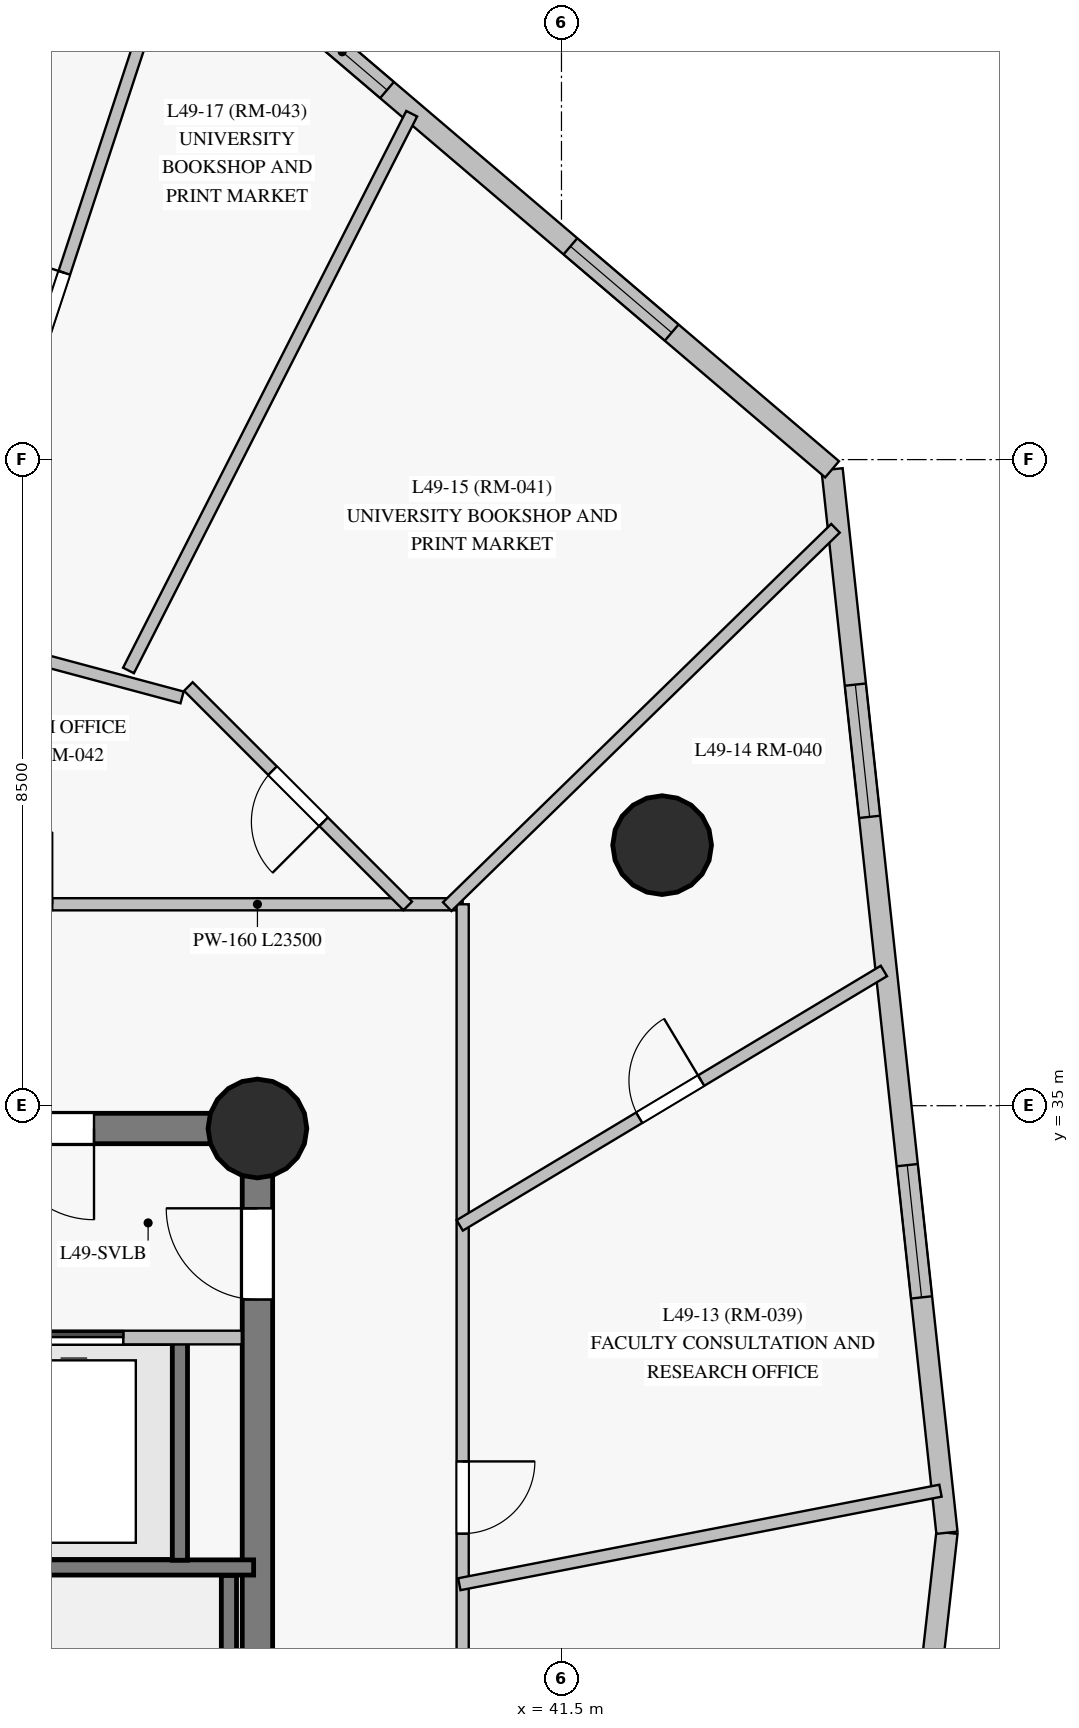
"""IFC4 building model, lengths in metres.
Left out: names, types, materials, properties, quantities, classifications, styles, units other than length and angle.
Written with IfcOpenShell. Run it as: python <this file> out.ifc"""

import sys

from ifc_helpers import new_model, si_unit, direction, frame, frame_2d, origin, origin_with_axes, origin_2d, place, context, subcontext, project, spatial, rectangle, circle, extrude, source, transform, mapped, element, fill, save


model = new_model("IFC4")
c1 = context("Model", 3, precision=1e-05, world=origin(), true_north=direction((0.0, 1.0)))
c2 = subcontext(c1, "Body", "Model", "MODEL_VIEW")
j1 = project(units=[si_unit("LENGTHUNIT", "METRE"), si_unit("PLANEANGLEUNIT", "RADIAN")], contexts=[c1])
p1 = place(None, origin())
s1 = spatial("IfcSite", under=j1, at=p1, CompositionType="ELEMENT")
p2 = place(p1, origin())
s2 = spatial("IfcBuilding", under=s1, at=p2, CompositionType="ELEMENT")
p3 = place(p2, frame((0.0, 0.0, 171.8)))
s3 = spatial("IfcBuildingStorey", under=s2, at=p3, CompositionType="ELEMENT", Elevation=171.8)
p4 = place(p3, frame((37.5, 18.3, 0.0), z_axis=(0.0, 0.0, 1.0), x_axis=(0.0, 1.0, 0.0)))
e1 = element("IfcWall", 1, at=p4, inside=s3, PredefinedType="SHEAR", context=c2, shape_type="SweptSolid", body=[
    extrude(rectangle(XDim=16.4, YDim=0.4, at=frame_2d((8.2, 0.0))), origin(), (0.0, 0.0, 1.0), 2.825),
])
p5 = place(p4, frame((14.15, 0.0, 0.0)))
e2 = element("IfcOpeningElement", 2, at=p5, cuts=e1, PredefinedType="OPENING", context=c2, shape_type="SweptSolid", body=[
    extrude(rectangle(XDim=1.2, YDim=2.15, at=frame_2d((0.6, 1.075))), frame((0.0, 0.21, 0.0), z_axis=(0.0, -1.0, 0.0), x_axis=(1.0, 0.0, 0.0)), (0.0, 0.0, 1.0), 0.42),
])
p6 = place(p3, frame((37.5, 34.7, 0.0), z_axis=(0.0, 0.0, 1.0), x_axis=(-1.0, 0.0, 0.0)))
e3 = element("IfcWall", 3, at=p6, inside=s3, PredefinedType="SHEAR", context=c2, shape_type="SweptSolid", body=[
    extrude(rectangle(XDim=10.95, YDim=0.4, at=frame_2d((5.475, 0.0))), origin(), (0.0, 0.0, 1.0), 2.825),
])
p7 = place(p6, frame((2.15, 0.0, 0.0)))
e4 = element("IfcOpeningElement", 4, at=p7, cuts=e3, PredefinedType="OPENING", context=c2, shape_type="SweptSolid", body=[
    extrude(rectangle(XDim=1.2, YDim=2.15, at=frame_2d((0.6, 1.075))), frame((0.0, 0.21, 0.0), z_axis=(0.0, -1.0, 0.0), x_axis=(1.0, 0.0, 0.0)), (0.0, 0.0, 1.0), 0.42),
])
p8 = place(p6, frame((6.35, 0.0, 0.0)))
e5 = element("IfcOpeningElement", 5, at=p8, cuts=e3, PredefinedType="OPENING", context=c2, shape_type="SweptSolid", body=[
    extrude(rectangle(XDim=1.1, YDim=2.15, at=frame_2d((0.55, 1.075))), frame((0.0, 0.21, 0.0), z_axis=(0.0, -1.0, 0.0), x_axis=(1.0, 0.0, 0.0)), (0.0, 0.0, 1.0), 0.42),
])
m1 = source(origin_with_axes(), c2, "Body", "SweptSolid", [
    extrude(circle(Radius=0.65, at=origin_2d()), origin(), (0.0, 0.0, 1.0), 3.05),
])
for number, where, z_axis, x_axis in (
    (6, (37.5, 34.7, 0.0), (0.0, 0.0, 1.0), (1.0, 0.0, 0.0)),
    (7, (42.824, 38.428, 0.0), (0.0, 0.0, 1.0), (1.0, 0.0, 0.0)),
):
    element("IfcColumn", number, at=place(p3, frame(where, z_axis=z_axis, x_axis=x_axis)), inside=s3, PredefinedType="COLUMN", context=c2, shape_type="MappedRepresentation", body=[
        mapped(m1, transform((0.0, 0.0, 0.0), scale=1.0)),
    ])
p9 = place(p3, frame((45.484, 19.686, 0.0), z_axis=(0.0, 0.0, 1.0), x_axis=(0.111472313182, 0.993767539918, 0.0)))
e8 = element("IfcWall", 8, at=p9, inside=s3, PredefinedType="SOLIDWALL", context=c2, shape_type="SweptSolid", body=[
    extrude(rectangle(XDim=9.757, YDim=0.28, at=frame_2d((4.878, 0.0))), origin(), (0.0, 0.0, 1.0), 2.825),
])
p10 = place(p9, frame((1.069, 0.0, 0.85)))
e9 = element("IfcOpeningElement", 9, at=p10, cuts=e8, PredefinedType="OPENING", context=c2, shape_type="SweptSolid", body=[
    extrude(rectangle(XDim=1.75, YDim=1.65, at=frame_2d((0.875, 0.825))), frame((0.0, 0.15, 0.0), z_axis=(0.0, -1.0, 0.0), x_axis=(1.0, 0.0, 0.0)), (0.0, 0.0, 1.0), 0.3),
])
p11 = place(p9, frame((5.888, 0.0, 0.85)))
e10 = element("IfcOpeningElement", 10, at=p11, cuts=e8, PredefinedType="OPENING", context=c2, shape_type="SweptSolid", body=[
    extrude(rectangle(XDim=1.75, YDim=1.65, at=frame_2d((0.875, 0.825))), frame((0.0, 0.15, 0.0), z_axis=(0.0, -1.0, 0.0), x_axis=(1.0, 0.0, 0.0)), (0.0, 0.0, 1.0), 0.3),
])
p12 = place(p3, frame((46.571, 29.382, 0.0), z_axis=(0.0, 0.0, 1.0), x_axis=(-0.107380334405, 0.994218016223, 0.0)))
e11 = element("IfcWall", 11, at=p12, inside=s3, PredefinedType="SOLIDWALL", context=c2, shape_type="SweptSolid", body=[
    extrude(rectangle(XDim=14.071, YDim=0.28, at=frame_2d((7.036, 0.0))), origin(), (0.0, 0.0, 1.0), 2.825),
])
p13 = place(p12, frame((3.114, 0.0, 0.85)))
e12 = element("IfcOpeningElement", 12, at=p13, cuts=e11, PredefinedType="OPENING", context=c2, shape_type="SweptSolid", body=[
    extrude(rectangle(XDim=1.75, YDim=1.65, at=frame_2d((0.875, 0.825))), frame((0.0, 0.15, 0.0), z_axis=(0.0, -1.0, 0.0), x_axis=(1.0, 0.0, 0.0)), (0.0, 0.0, 1.0), 0.3),
])
p14 = place(p12, frame((9.473, 0.0, 0.85)))
e13 = element("IfcOpeningElement", 13, at=p14, cuts=e11, PredefinedType="OPENING", context=c2, shape_type="SweptSolid", body=[
    extrude(rectangle(XDim=1.75, YDim=1.65, at=frame_2d((0.875, 0.825))), frame((0.0, 0.15, 0.0), z_axis=(0.0, -1.0, 0.0), x_axis=(1.0, 0.0, 0.0)), (0.0, 0.0, 1.0), 0.3),
])
p15 = place(p3, frame((45.06, 43.372, 0.0), z_axis=(0.0, 0.0, 1.0), x_axis=(-0.761082698503, 0.64865485895, 0.0)))
e14 = element("IfcWall", 14, at=p15, inside=s3, PredefinedType="SOLIDWALL", context=c2, shape_type="SweptSolid", body=[
    extrude(rectangle(XDim=9.761, YDim=0.28, at=frame_2d((4.88, 0.0))), origin(), (0.0, 0.0, 1.0), 2.825),
])
p16 = place(p15, frame((2.773, 0.0, 0.85)))
e15 = element("IfcOpeningElement", 15, at=p16, cuts=e14, PredefinedType="OPENING", context=c2, shape_type="SweptSolid", body=[
    extrude(rectangle(XDim=1.75, YDim=1.65, at=frame_2d((0.875, 0.825))), frame((0.0, 0.15, 0.0), z_axis=(0.0, -1.0, 0.0), x_axis=(1.0, 0.0, 0.0)), (0.0, 0.0, 1.0), 0.3),
])
p17 = place(p15, frame((7.693, 0.0, 0.85)))
e16 = element("IfcOpeningElement", 16, at=p17, cuts=e14, PredefinedType="OPENING", context=c2, shape_type="SweptSolid", body=[
    extrude(rectangle(XDim=1.55, YDim=1.65, at=frame_2d((0.775, 0.825))), frame((0.0, 0.15, 0.0), z_axis=(0.0, -1.0, 0.0), x_axis=(1.0, 0.0, 0.0)), (0.0, 0.0, 1.0), 0.3),
])
p18 = place(p3, frame((37.125, 21.32, 0.0), z_axis=(0.0, 0.0, 1.0), x_axis=(0.0, 1.0, 0.0)))
e17 = element("IfcWall", 17, at=p18, inside=s3, PredefinedType="SHEAR", context=c2, shape_type="SweptSolid", body=[
    extrude(rectangle(XDim=7.5, YDim=0.2, at=frame_2d((3.75, 0.0))), origin(), (0.0, 0.0, 1.0), 2.825),
])
p19 = place(p3, frame((33.455, 28.925, 0.0), z_axis=(0.0, 0.0, 1.0), x_axis=(1.0, 0.0, 0.0)))
e18 = element("IfcWall", 18, at=p19, inside=s3, PredefinedType="SHEAR", context=c2, shape_type="SweptSolid", body=[
    extrude(rectangle(XDim=3.995, YDim=0.2, at=frame_2d((1.998, 0.0))), origin(), (0.0, 0.0, 1.0), 2.825),
])
p20 = place(p3, frame((36.48, 29.02, 0.0), z_axis=(0.0, 0.0, 1.0), x_axis=(0.0, 1.0, 0.0)))
e19 = element("IfcWall", 19, at=p20, inside=s3, PredefinedType="SHEAR", context=c2, shape_type="SweptSolid", body=[
    extrude(rectangle(XDim=2.86, YDim=0.2, at=frame_2d((1.43, 0.0))), origin(), (0.0, 0.0, 1.0), 2.825),
])
p21 = place(p3, frame((16.7, 37.65, 0.0), z_axis=(0.0, 0.0, 1.0), x_axis=(1.0, 0.0, 0.0)))
e20 = element("IfcWall", 20, at=p21, inside=s3, PredefinedType="PARTITIONING", context=c2, shape_type="SweptSolid", body=[
    extrude(rectangle(XDim=23.5, YDim=0.16, at=frame_2d((11.75, 0.0))), origin(), (0.0, 0.0, 1.0), 2.375),
])
p22 = place(p21, frame((17.15, 0.0, 0.0)))
e21 = element("IfcOpeningElement", 21, at=p22, cuts=e20, PredefinedType="OPENING", context=c2, shape_type="SweptSolid", body=[
    extrude(rectangle(XDim=0.95, YDim=2.15, at=frame_2d((0.475, 1.075))), frame((0.0, 0.09, 0.0), z_axis=(0.0, -1.0, 0.0), x_axis=(1.0, 0.0, 0.0)), (0.0, 0.0, 1.0), 0.18),
])
p23 = place(p21, frame((14.31, 0.0, 0.0)))
e22 = element("IfcOpeningElement", 22, at=p23, cuts=e20, PredefinedType="OPENING", context=c2, shape_type="SweptSolid", body=[
    extrude(rectangle(XDim=0.95, YDim=2.15, at=frame_2d((0.475, 1.075))), frame((0.0, 0.09, 0.0), z_axis=(0.0, -1.0, 0.0), x_axis=(1.0, 0.0, 0.0)), (0.0, 0.0, 1.0), 0.18),
])
p24 = place(p21, frame((11.915, 0.0, 0.0)))
e23 = element("IfcOpeningElement", 23, at=p24, cuts=e20, PredefinedType="OPENING", context=c2, shape_type="SweptSolid", body=[
    extrude(rectangle(XDim=0.95, YDim=2.15, at=frame_2d((0.475, 1.075))), frame((0.0, 0.09, 0.0), z_axis=(0.0, -1.0, 0.0), x_axis=(1.0, 0.0, 0.0)), (0.0, 0.0, 1.0), 0.18),
])
p25 = place(p21, frame((7.75, 0.0, 0.0)))
e24 = element("IfcOpeningElement", 24, at=p25, cuts=e20, PredefinedType="OPENING", context=c2, shape_type="SweptSolid", body=[
    extrude(rectangle(XDim=0.95, YDim=2.15, at=frame_2d((0.475, 1.075))), frame((0.0, 0.09, 0.0), z_axis=(0.0, -1.0, 0.0), x_axis=(1.0, 0.0, 0.0)), (0.0, 0.0, 1.0), 0.18),
])
p26 = place(p21, frame((5.01, 0.0, 0.0)))
e25 = element("IfcOpeningElement", 25, at=p26, cuts=e20, PredefinedType="OPENING", context=c2, shape_type="SweptSolid", body=[
    extrude(rectangle(XDim=0.95, YDim=2.15, at=frame_2d((0.475, 1.075))), frame((0.0, 0.09, 0.0), z_axis=(0.0, -1.0, 0.0), x_axis=(1.0, 0.0, 0.0)), (0.0, 0.0, 1.0), 0.18),
])
p27 = place(p3, frame((40.2, 37.65, 0.0), z_axis=(0.0, 0.0, 1.0), x_axis=(0.0, -1.0, 0.0)))
e26 = element("IfcWall", 26, at=p27, inside=s3, PredefinedType="PARTITIONING", context=c2, shape_type="SweptSolid", body=[
    extrude(rectangle(XDim=22.3, YDim=0.16, at=frame_2d((11.15, 0.0))), origin(), (0.0, 0.0, 1.0), 2.375),
])
p28 = place(p27, frame((14.02, 0.0, 0.0)))
e27 = element("IfcOpeningElement", 27, at=p28, cuts=e26, PredefinedType="OPENING", context=c2, shape_type="SweptSolid", body=[
    extrude(rectangle(XDim=0.95, YDim=2.15, at=frame_2d((0.475, 1.075))), frame((0.0, 0.09, 0.0), z_axis=(0.0, -1.0, 0.0), x_axis=(1.0, 0.0, 0.0)), (0.0, 0.0, 1.0), 0.18),
])
p29 = place(p27, frame((10.675, 0.0, 0.0)))
e28 = element("IfcOpeningElement", 28, at=p29, cuts=e26, PredefinedType="OPENING", context=c2, shape_type="SweptSolid", body=[
    extrude(rectangle(XDim=0.95, YDim=2.15, at=frame_2d((0.475, 1.075))), frame((0.0, 0.09, 0.0), z_axis=(0.0, -1.0, 0.0), x_axis=(1.0, 0.0, 0.0)), (0.0, 0.0, 1.0), 0.18),
])
p30 = place(p27, frame((7.33, 0.0, 0.0)))
e29 = element("IfcOpeningElement", 29, at=p30, cuts=e26, PredefinedType="OPENING", context=c2, shape_type="SweptSolid", body=[
    extrude(rectangle(XDim=0.95, YDim=2.15, at=frame_2d((0.475, 1.075))), frame((0.0, 0.09, 0.0), z_axis=(0.0, -1.0, 0.0), x_axis=(1.0, 0.0, 0.0)), (0.0, 0.0, 1.0), 0.18),
])
p31 = place(p3, frame((33.447, 41.357, 0.0), z_axis=(0.0, 0.0, 1.0), x_axis=(0.312266005105, 0.94999470633, 0.0)))
e30 = element("IfcWall", 30, at=p31, inside=s3, PredefinedType="PARTITIONING", context=c2, shape_type="SweptSolid", body=[
    extrude(rectangle(XDim=8.769, YDim=0.16, at=frame_2d((4.385, 0.0))), origin(), (0.0, 0.0, 1.0), 2.825),
])
p32 = place(p31, frame((3.892, 0.0, 0.0)))
e31 = element("IfcOpeningElement", 31, at=p32, cuts=e30, PredefinedType="OPENING", context=c2, shape_type="SweptSolid", body=[
    extrude(rectangle(XDim=0.95, YDim=2.15, at=frame_2d((0.475, 1.075))), frame((0.0, 0.09, 0.0), z_axis=(0.0, -1.0, 0.0), x_axis=(1.0, 0.0, 0.0)), (0.0, 0.0, 1.0), 0.18),
])
p33 = place(p3, frame((35.804, 40.726, 0.0), z_axis=(0.0, 0.0, 1.0), x_axis=(0.453382302462, 0.891316154804, 0.0)))
e32 = element("IfcWall", 32, at=p33, inside=s3, PredefinedType="PARTITIONING", context=c2, shape_type="SweptSolid", body=[
    extrude(rectangle(XDim=8.218, YDim=0.16, at=frame_2d((4.109, 0.0))), origin(), (0.0, 0.0, 1.0), 2.825),
])
p34 = place(p3, frame((39.997, 37.619, 0.0), z_axis=(0.0, 0.0, 1.0), x_axis=(0.716204142826, 0.69789084089, 0.0)))
e33 = element("IfcWall", 33, at=p34, inside=s3, PredefinedType="PARTITIONING", context=c2, shape_type="SweptSolid", body=[
    extrude(rectangle(XDim=7.132, YDim=0.16, at=frame_2d((3.566, 0.0))), origin(), (0.0, 0.0, 1.0), 2.825),
])
p35 = place(p3, frame((40.161, 33.425, 0.0), z_axis=(0.0, 0.0, 1.0), x_axis=(0.857539265449, 0.514418514649, 0.0)))
e34 = element("IfcWall", 34, at=p35, inside=s3, PredefinedType="PARTITIONING", context=c2, shape_type="SweptSolid", body=[
    extrude(rectangle(XDim=6.508, YDim=0.16, at=frame_2d((3.254, 0.0))), origin(), (0.0, 0.0, 1.0), 2.825),
])
p36 = place(p35, frame((2.754, 0.0, 0.0)))
e35 = element("IfcOpeningElement", 35, at=p36, cuts=e34, PredefinedType="OPENING", context=c2, shape_type="SweptSolid", body=[
    extrude(rectangle(XDim=0.95, YDim=2.15, at=frame_2d((0.475, 1.075))), frame((0.0, 0.09, 0.0), z_axis=(0.0, -1.0, 0.0), x_axis=(1.0, 0.0, 0.0)), (0.0, 0.0, 1.0), 0.18),
])
p37 = place(p3, frame((40.156, 28.705, 0.0), z_axis=(0.0, 0.0, 1.0), x_axis=(0.981627800611, 0.19080582032, 0.0)))
e36 = element("IfcWall", 36, at=p37, inside=s3, PredefinedType="PARTITIONING", context=c2, shape_type="SweptSolid", body=[
    extrude(rectangle(XDim=6.449, YDim=0.16, at=frame_2d((3.224, 0.0))), origin(), (0.0, 0.0, 1.0), 2.825),
])
p38 = place(p3, frame((39.477, 37.629, 0.0), z_axis=(0.0, 0.0, 1.0), x_axis=(-0.707136690743, 0.707076870365, 0.0)))
e37 = element("IfcWall", 37, at=p38, inside=s3, PredefinedType="PARTITIONING", context=c2, shape_type="SweptSolid", body=[
    extrude(rectangle(XDim=4.081, YDim=0.16, at=frame_2d((2.041, 0.0))), origin(), (0.0, 0.0, 1.0), 2.375),
])
p39 = place(p38, frame((1.566, 0.0, 0.0)))
e38 = element("IfcOpeningElement", 38, at=p39, cuts=e37, PredefinedType="OPENING", context=c2, shape_type="SweptSolid", body=[
    extrude(rectangle(XDim=0.95, YDim=2.15, at=frame_2d((0.475, 1.075))), frame((0.0, 0.09, 0.0), z_axis=(0.0, -1.0, 0.0), x_axis=(1.0, 0.0, 0.0)), (0.0, 0.0, 1.0), 0.18),
])
p40 = place(p3, frame((33.535, 31.95, 0.0), z_axis=(0.0, 0.0, 1.0), x_axis=(1.0, 0.0, 0.0)))
e39 = element("IfcWall", 39, at=p40, inside=s3, PredefinedType="PARTITIONING", context=c2, shape_type="SweptSolid", body=[
    extrude(rectangle(XDim=3.759, YDim=0.18, at=frame_2d((1.879, 0.0))), origin(), (0.0, 0.0, 1.0), 2.825),
])
p41 = place(p40, frame((0.9, 0.0, 0.0)))
e40 = element("IfcOpeningElement", 40, at=p41, cuts=e39, PredefinedType="OPENING", context=c2, shape_type="SweptSolid", body=[
    extrude(rectangle(XDim=1.3, YDim=2.2, at=frame_2d((0.65, 1.1))), frame((0.0, 0.1, 0.0), z_axis=(0.0, -1.0, 0.0), x_axis=(1.0, 0.0, 0.0)), (0.0, 0.0, 1.0), 0.2),
])
p42 = place(p3, frame((33.397, 41.205, 0.0), z_axis=(0.0, 0.0, 1.0), x_axis=(0.965920984925, -0.258837112643, 0.0)))
e41 = element("IfcWall", 41, at=p42, inside=s3, PredefinedType="PARTITIONING", context=c2, shape_type="SweptSolid", body=[
    extrude(rectangle(XDim=3.221, YDim=0.16, at=frame_2d((1.611, 0.0))), origin(), (0.0, 0.0, 1.0), 2.495),
])
m2 = source(origin_with_axes(), c2, "Body", "SweptSolid", [
    extrude(rectangle(XDim=1.75, YDim=1.65, at=frame_2d((0.875, 0.825))), frame((0.0, 0.03, 0.0), z_axis=(0.0, -1.0, 0.0), x_axis=(1.0, 0.0, 0.0)), (0.0, 0.0, 1.0), 0.06),
])
p43 = place(p13, origin())
e42 = element("IfcWindow", 42, at=p43, inside=s3, PartitioningType="SINGLE_PANEL", PredefinedType="WINDOW", context=c2, shape_type="MappedRepresentation", body=[
    mapped(m2, transform((0.0, 0.0, 0.0), scale=1.0)),
])
fill(e12, e42)
p44 = place(p14, origin())
e43 = element("IfcWindow", 43, at=p44, inside=s3, PartitioningType="SINGLE_PANEL", PredefinedType="WINDOW", context=c2, shape_type="MappedRepresentation", body=[
    mapped(m2, transform((0.0, 0.0, 0.0), scale=1.0)),
])
fill(e13, e43)
p45 = place(p16, origin())
e44 = element("IfcWindow", 44, at=p45, inside=s3, PartitioningType="SINGLE_PANEL", PredefinedType="WINDOW", context=c2, shape_type="MappedRepresentation", body=[
    mapped(m2, transform((0.0, 0.0, 0.0), scale=1.0)),
])
fill(e15, e44)
m3 = source(origin_with_axes(), c2, "Body", "SweptSolid", [
    extrude(rectangle(XDim=1.55, YDim=1.65, at=frame_2d((0.775, 0.825))), frame((0.0, 0.03, 0.0), z_axis=(0.0, -1.0, 0.0), x_axis=(1.0, 0.0, 0.0)), (0.0, 0.0, 1.0), 0.06),
])
p46 = place(p17, origin())
e45 = element("IfcWindow", 45, at=p46, inside=s3, PartitioningType="SINGLE_PANEL", PredefinedType="WINDOW", context=c2, shape_type="MappedRepresentation", body=[
    mapped(m3, transform((0.0, 0.0, 0.0), scale=1.0)),
])
fill(e16, e45)
m4 = source(origin_with_axes(), c2, "Body", "SweptSolid", [
    extrude(rectangle(XDim=1.2, YDim=2.15, at=frame_2d((0.6, 1.075))), frame((0.0, 0.025, 0.0), z_axis=(0.0, -1.0, 0.0), x_axis=(1.0, 0.0, 0.0)), (0.0, 0.0, 1.0), 0.05),
])
p47 = place(p5, origin())
e46 = element("IfcDoor", 46, at=p47, inside=s3, OperationType="SINGLE_SWING_RIGHT", PredefinedType="DOOR", context=c2, shape_type="MappedRepresentation", body=[
    mapped(m4, transform((0.0, 0.0, 0.0), scale=1.0)),
])
fill(e2, e46)
p48 = place(p7, origin())
e47 = element("IfcDoor", 47, at=p48, inside=s3, OperationType="SINGLE_SWING_LEFT", PredefinedType="DOOR", context=c2, shape_type="MappedRepresentation", body=[
    mapped(m4, transform((0.0, 0.0, 0.0), scale=1.0)),
])
fill(e4, e47)
m5 = source(origin_with_axes(), c2, "Body", "SweptSolid", [
    extrude(rectangle(XDim=1.3, YDim=2.2, at=frame_2d((0.65, 1.1))), frame((0.0, 0.025, 0.0), z_axis=(0.0, -1.0, 0.0), x_axis=(1.0, 0.0, 0.0)), (0.0, 0.0, 1.0), 0.05),
])
p49 = place(p41, origin())
e48 = element("IfcDoor", 48, at=p49, inside=s3, OperationType="SLIDING_TO_LEFT", PredefinedType="DOOR", context=c2, shape_type="MappedRepresentation", body=[
    mapped(m5, transform((0.0, 0.0, 0.0), scale=1.0)),
])
fill(e40, e48)
m6 = source(origin_with_axes(), c2, "Body", "SweptSolid", [
    extrude(rectangle(XDim=0.95, YDim=2.15, at=frame_2d((0.475, 1.075))), frame((0.0, 0.025, 0.0), z_axis=(0.0, -1.0, 0.0), x_axis=(1.0, 0.0, 0.0)), (0.0, 0.0, 1.0), 0.05),
])
p50 = place(p30, origin())
e49 = element("IfcDoor", 49, at=p50, inside=s3, OperationType="SINGLE_SWING_LEFT", PredefinedType="DOOR", context=c2, shape_type="MappedRepresentation", body=[
    mapped(m6, transform((0.0, 0.0, 0.0), scale=1.0)),
])
fill(e29, e49)
p51 = place(p36, origin())
e50 = element("IfcDoor", 50, at=p51, inside=s3, OperationType="SINGLE_SWING_RIGHT", PredefinedType="DOOR", context=c2, shape_type="MappedRepresentation", body=[
    mapped(m6, transform((0.0, 0.0, 0.0), scale=1.0)),
])
fill(e35, e50)
p52 = place(p39, origin())
e51 = element("IfcDoor", 51, at=p52, inside=s3, OperationType="SINGLE_SWING_LEFT", PredefinedType="DOOR", context=c2, shape_type="MappedRepresentation", body=[
    mapped(m6, transform((0.0, 0.0, 0.0), scale=1.0)),
])
fill(e38, e51)
p53 = place(p32, origin())
e52 = element("IfcDoor", 52, at=p53, inside=s3, OperationType="SINGLE_SWING_RIGHT", PredefinedType="DOOR", context=c2, shape_type="MappedRepresentation", body=[
    mapped(m6, transform((0.0, 0.0, 0.0), scale=1.0)),
])
fill(e31, e52)
save(model, sys.argv[1])
